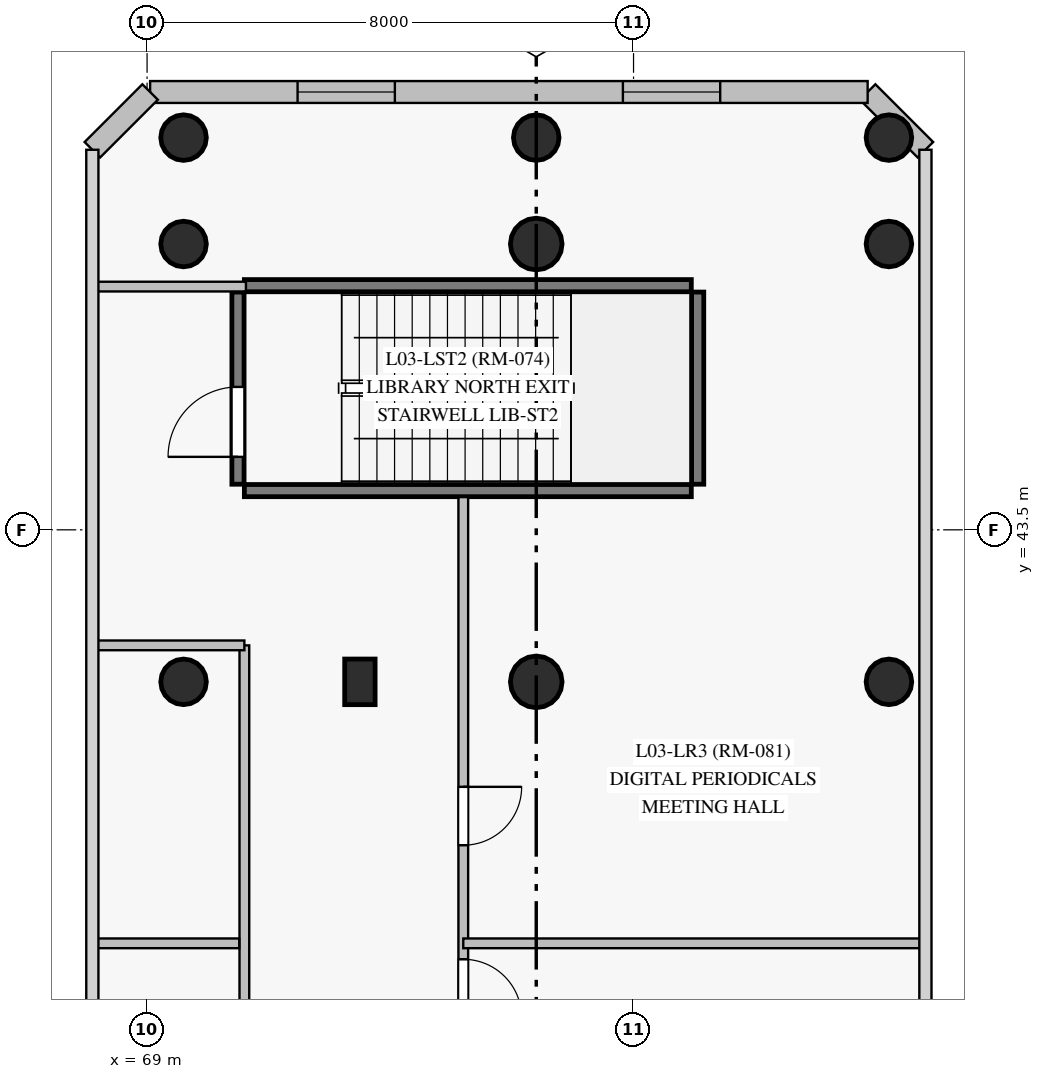
"""IFC4 building model, lengths in metres.
Left out: names, types, materials, properties, quantities, classifications, styles, units other than length and angle.
Written with IfcOpenShell. Run it as: python <this file> out.ifc"""

import sys

from ifc_helpers import new_model, si_unit, direction, frame, frame_2d, origin, origin_with_axes, origin_2d, place, context, subcontext, project, spatial, rectangle, circle, extrude, source, transform, mapped, element, fill, save


model = new_model("IFC4")
c1 = context("Model", 3, precision=1e-05, world=origin(), true_north=direction((0.0, 1.0)))
c2 = subcontext(c1, "Body", "Model", "MODEL_VIEW")
j1 = project(units=[si_unit("LENGTHUNIT", "METRE"), si_unit("PLANEANGLEUNIT", "RADIAN")], contexts=[c1])
p1 = place(None, origin())
s1 = spatial("IfcSite", under=j1, at=p1, CompositionType="ELEMENT")
p2 = place(p1, origin())
s2 = spatial("IfcBuilding", under=s1, at=p2, CompositionType="ELEMENT")
p3 = place(p2, frame((0.0, 0.0, 13.5)))
s3 = spatial("IfcBuildingStorey", under=s2, at=p3, CompositionType="ELEMENT", Elevation=13.5)
m1 = source(origin_with_axes(), c2, "Body", "SweptSolid", [
    extrude(circle(Radius=0.375, at=origin_2d()), origin(), (0.0, 0.0, 1.0), 4.5),
])
for number, where, z_axis, x_axis in (
    (1, (69.6, 49.95, 0.0), (0.0, 0.0, 1.0), (1.0, 0.0, 0.0)),
    (2, (75.4, 49.95, 0.0), (0.0, 0.0, 1.0), (1.0, 0.0, 0.0)),
    (3, (81.2, 49.95, 0.0), (0.0, 0.0, 1.0), (1.0, 0.0, 0.0)),
    (4, (69.6, 41.0, 0.0), (0.0, 0.0, 1.0), (1.0, 0.0, 0.0)),
    (5, (69.6, 48.2, 0.0), (0.0, 0.0, 1.0), (1.0, 0.0, 0.0)),
):
    element("IfcColumn", number, at=place(p3, frame(where, z_axis=z_axis, x_axis=x_axis)), inside=s3, PredefinedType="COLUMN", context=c2, shape_type="MappedRepresentation", body=[
        mapped(m1, transform((0.0, 0.0, 0.0), scale=1.0)),
    ])
m2 = source(origin_with_axes(), c2, "Body", "SweptSolid", [
    extrude(circle(Radius=0.425, at=origin_2d()), origin(), (0.0, 0.0, 1.0), 4.5),
])
for number, where, z_axis, x_axis in (
    (6, (75.4, 41.0, 0.0), (0.0, 0.0, 1.0), (1.0, 0.0, 0.0)),
    (7, (75.4, 48.2, 0.0), (0.0, 0.0, 1.0), (1.0, 0.0, 0.0)),
):
    element("IfcColumn", number, at=place(p3, frame(where, z_axis=z_axis, x_axis=x_axis)), inside=s3, PredefinedType="COLUMN", context=c2, shape_type="MappedRepresentation", body=[
        mapped(m2, transform((0.0, 0.0, 0.0), scale=1.0)),
    ])
for number, where, z_axis, x_axis in (
    (8, (81.2, 41.0, 0.0), (0.0, 0.0, 1.0), (1.0, 0.0, 0.0)),
    (9, (81.2, 48.2, 0.0), (0.0, 0.0, 1.0), (1.0, 0.0, 0.0)),
):
    element("IfcColumn", number, at=place(p3, frame(where, z_axis=z_axis, x_axis=x_axis)), inside=s3, PredefinedType="COLUMN", context=c2, shape_type="MappedRepresentation", body=[
        mapped(m1, transform((0.0, 0.0, 0.0), scale=1.0)),
    ])
m3 = source(origin_with_axes(), c2, "Body", "SweptSolid", [
    extrude(rectangle(XDim=0.5, YDim=0.75, at=origin_2d()), origin(), (0.0, 0.0, 1.0), 4.5),
])
p4 = place(p3, frame((72.5, 41.0, 0.0), z_axis=(0.0, 0.0, 1.0), x_axis=(1.0, 0.0, 0.0)))
e10 = element("IfcColumn", 10, at=p4, inside=s3, PredefinedType="PILASTER", context=c2, shape_type="MappedRepresentation", body=[
    mapped(m3, transform((0.0, 0.0, 0.0), scale=1.0)),
])
p5 = place(p3, frame((81.8, 49.75, 0.0), z_axis=(0.0, 0.0, 1.0), x_axis=(-0.707106781187, 0.707106781187, 0.0)))
e11 = element("IfcWall", 11, at=p5, inside=s3, PredefinedType="SOLIDWALL", context=c2, shape_type="SweptSolid", body=[
    extrude(rectangle(XDim=1.344, YDim=0.36, at=frame_2d((0.672, 0.0))), origin(), (0.0, 0.0, 1.0), 4.225),
])
p6 = place(p3, frame((80.85, 50.7, 0.0), z_axis=(0.0, 0.0, 1.0), x_axis=(-1.0, 0.0, 0.0)))
e12 = element("IfcWall", 12, at=p6, inside=s3, PredefinedType="SOLIDWALL", context=c2, shape_type="SweptSolid", body=[
    extrude(rectangle(XDim=11.8, YDim=0.36, at=frame_2d((5.9, 0.0))), origin(), (0.0, 0.0, 1.0), 4.225),
])
p7 = place(p6, frame((2.425, 0.0, 0.85)))
e13 = element("IfcOpeningElement", 13, at=p7, cuts=e12, PredefinedType="OPENING", context=c2, shape_type="SweptSolid", body=[
    extrude(rectangle(XDim=1.6, YDim=2.2, at=frame_2d((0.8, 1.1))), frame((0.0, 0.19, 0.0), z_axis=(0.0, -1.0, 0.0), x_axis=(1.0, 0.0, 0.0)), (0.0, 0.0, 1.0), 0.38),
])
p8 = place(p6, frame((7.775, 0.0, 0.85)))
e14 = element("IfcOpeningElement", 14, at=p8, cuts=e12, PredefinedType="OPENING", context=c2, shape_type="SweptSolid", body=[
    extrude(rectangle(XDim=1.6, YDim=2.2, at=frame_2d((0.8, 1.1))), frame((0.0, 0.19, 0.0), z_axis=(0.0, -1.0, 0.0), x_axis=(1.0, 0.0, 0.0)), (0.0, 0.0, 1.0), 0.38),
])
p9 = place(p3, frame((69.05, 50.7, 0.0), z_axis=(0.0, 0.0, 1.0), x_axis=(-0.707106781187, -0.707106781187, 0.0)))
e15 = element("IfcWall", 15, at=p9, inside=s3, PredefinedType="SOLIDWALL", context=c2, shape_type="SweptSolid", body=[
    extrude(rectangle(XDim=1.344, YDim=0.36, at=frame_2d((0.672, 0.0))), origin(), (0.0, 0.0, 1.0), 4.225),
])
for number, where, z_axis, x_axis in (
    (16, (70.6, 44.145, 0.0), (0.0, 0.0, 1.0), (1.0, 0.0, 0.0)),
    (17, (70.6, 47.515, 0.0), (0.0, 0.0, 1.0), (1.0, 0.0, 0.0)),
):
    element("IfcWall", number, at=place(p3, frame(where, z_axis=z_axis, x_axis=x_axis)), inside=s3, PredefinedType="SHEAR", context=c2, shape_type="SweptSolid", body=[
        extrude(rectangle(XDim=7.35, YDim=0.2, at=frame_2d((3.675, 0.0))), origin(), (0.0, 0.0, 1.0), 4.225),
    ])
p10 = place(p3, frame((70.495, 44.25, 0.0), z_axis=(0.0, 0.0, 1.0), x_axis=(0.0, 1.0, 0.0)))
e18 = element("IfcWall", 18, at=p10, inside=s3, PredefinedType="SHEAR", context=c2, shape_type="SweptSolid", body=[
    extrude(rectangle(XDim=3.16, YDim=0.2, at=frame_2d((1.58, 0.0))), origin(), (0.0, 0.0, 1.0), 4.225),
])
p11 = place(p10, frame((0.45, 0.0, 0.0)))
e19 = element("IfcOpeningElement", 19, at=p11, cuts=e18, PredefinedType="OPENING", context=c2, shape_type="SweptSolid", body=[
    extrude(rectangle(XDim=1.15, YDim=2.15, at=frame_2d((0.575, 1.075))), frame((0.0, 0.11, 0.0), z_axis=(0.0, -1.0, 0.0), x_axis=(1.0, 0.0, 0.0)), (0.0, 0.0, 1.0), 0.22),
])
p12 = place(p3, frame((78.055, 44.25, 0.0), z_axis=(0.0, 0.0, 1.0), x_axis=(0.0, 1.0, 0.0)))
e20 = element("IfcWall", 20, at=p12, inside=s3, PredefinedType="SHEAR", context=c2, shape_type="SweptSolid", body=[
    extrude(rectangle(XDim=3.16, YDim=0.2, at=frame_2d((1.58, 0.0))), origin(), (0.0, 0.0, 1.0), 4.225),
])
p13 = place(p3, frame((70.6, 11.4, 0.0), z_axis=(0.0, 0.0, 1.0), x_axis=(0.0, 1.0, 0.0)))
e21 = element("IfcWall", 21, at=p13, inside=s3, PredefinedType="PARTITIONING", context=c2, shape_type="SweptSolid", body=[
    extrude(rectangle(XDim=30.2, YDim=0.16, at=frame_2d((15.1, 0.0))), origin(), (0.0, 0.0, 1.0), 4.225),
])
p14 = place(p3, frame((74.2, 44.038, 0.0), z_axis=(0.0, 0.0, 1.0), x_axis=(0.0, -1.0, 0.0)))
e22 = element("IfcWall", 22, at=p14, inside=s3, PredefinedType="PARTITIONING", context=c2, shape_type="SweptSolid", body=[
    extrude(rectangle(XDim=15.138, YDim=0.16, at=frame_2d((7.569, 0.0))), origin(), (0.0, 0.0, 1.0), 4.225),
])
p15 = place(p14, frame((7.6, 0.0, 0.0)))
e23 = element("IfcOpeningElement", 23, at=p15, cuts=e22, PredefinedType="OPENING", context=c2, shape_type="SweptSolid", body=[
    extrude(rectangle(XDim=0.96, YDim=2.15, at=frame_2d((0.48, 1.075))), frame((0.0, 0.09, 0.0), z_axis=(0.0, -1.0, 0.0), x_axis=(1.0, 0.0, 0.0)), (0.0, 0.0, 1.0), 0.18),
])
p16 = place(p14, frame((4.764, 0.0, 0.0)))
e24 = element("IfcOpeningElement", 24, at=p16, cuts=e22, PredefinedType="OPENING", context=c2, shape_type="SweptSolid", body=[
    extrude(rectangle(XDim=0.96, YDim=2.15, at=frame_2d((0.48, 1.075))), frame((0.0, 0.09, 0.0), z_axis=(0.0, -1.0, 0.0), x_axis=(1.0, 0.0, 0.0)), (0.0, 0.0, 1.0), 0.18),
])
p17 = place(p3, frame((74.2, 36.7, 0.0), z_axis=(0.0, 0.0, 1.0), x_axis=(1.0, 0.0, 0.0)))
e25 = element("IfcWall", 25, at=p17, inside=s3, PredefinedType="PARTITIONING", context=c2, shape_type="SweptSolid", body=[
    extrude(rectangle(XDim=7.545, YDim=0.16, at=frame_2d((3.772, 0.0))), origin(), (0.0, 0.0, 1.0), 4.225),
])
p18 = place(p3, frame((68.155, 36.7, 0.0), z_axis=(0.0, 0.0, 1.0), x_axis=(1.0, 0.0, 0.0)))
e26 = element("IfcWall", 26, at=p18, inside=s3, PredefinedType="PARTITIONING", context=c2, shape_type="SweptSolid", body=[
    extrude(rectangle(XDim=2.36, YDim=0.16, at=frame_2d((1.18, 0.0))), origin(), (0.0, 0.0, 1.0), 4.225),
])
p19 = place(p3, frame((70.6, 41.6, 0.0), z_axis=(0.0, 0.0, 1.0), x_axis=(-1.0, 0.0, 0.0)))
e27 = element("IfcWall", 27, at=p19, inside=s3, PredefinedType="PARTITIONING", context=c2, shape_type="SweptSolid", body=[
    extrude(rectangle(XDim=2.415, YDim=0.16, at=frame_2d((1.208, 0.0))), origin(), (0.0, 0.0, 1.0), 3.575),
])
p20 = place(p3, frame((68.185, 47.5, 0.0), z_axis=(0.0, 0.0, 1.0), x_axis=(1.0, 0.0, 0.0)))
e28 = element("IfcWall", 28, at=p20, inside=s3, PredefinedType="PARTITIONING", context=c2, shape_type="SweptSolid", body=[
    extrude(rectangle(XDim=2.441, YDim=0.16, at=frame_2d((1.22, 0.0))), origin(), (0.0, 0.0, 1.0), 4.225),
])
m4 = source(origin_with_axes(), c2, "Body", "SweptSolid", [
    extrude(rectangle(XDim=1.6, YDim=2.2, at=frame_2d((0.8, 1.1))), frame((0.0, 0.03, 0.0), z_axis=(0.0, -1.0, 0.0), x_axis=(1.0, 0.0, 0.0)), (0.0, 0.0, 1.0), 0.06),
])
p21 = place(p7, origin())
e29 = element("IfcWindow", 29, at=p21, inside=s3, PartitioningType="SINGLE_PANEL", PredefinedType="WINDOW", context=c2, shape_type="MappedRepresentation", body=[
    mapped(m4, transform((0.0, 0.0, 0.0), scale=1.0)),
])
fill(e13, e29)
p22 = place(p8, origin())
e30 = element("IfcWindow", 30, at=p22, inside=s3, PartitioningType="SINGLE_PANEL", PredefinedType="WINDOW", context=c2, shape_type="MappedRepresentation", body=[
    mapped(m4, transform((0.0, 0.0, 0.0), scale=1.0)),
])
fill(e14, e30)
m5 = source(origin_with_axes(), c2, "Body", "SweptSolid", [
    extrude(rectangle(XDim=1.15, YDim=2.15, at=frame_2d((0.575, 1.075))), frame((0.0, 0.025, 0.0), z_axis=(0.0, -1.0, 0.0), x_axis=(1.0, 0.0, 0.0)), (0.0, 0.0, 1.0), 0.05),
])
p23 = place(p11, origin())
e31 = element("IfcDoor", 31, at=p23, inside=s3, OperationType="SINGLE_SWING_LEFT", PredefinedType="DOOR", context=c2, shape_type="MappedRepresentation", body=[
    mapped(m5, transform((0.0, 0.0, 0.0), scale=1.0)),
])
fill(e19, e31)
m6 = source(origin_with_axes(), c2, "Body", "SweptSolid", [
    extrude(rectangle(XDim=0.96, YDim=2.15, at=frame_2d((0.48, 1.075))), frame((0.0, 0.025, 0.0), z_axis=(0.0, -1.0, 0.0), x_axis=(1.0, 0.0, 0.0)), (0.0, 0.0, 1.0), 0.05),
])
p24 = place(p15, origin())
e32 = element("IfcDoor", 32, at=p24, inside=s3, OperationType="SINGLE_SWING_RIGHT", PredefinedType="DOOR", context=c2, shape_type="MappedRepresentation", body=[
    mapped(m6, transform((0.0, 0.0, 0.0), scale=1.0)),
])
fill(e23, e32)
p25 = place(p16, origin())
e33 = element("IfcDoor", 33, at=p25, inside=s3, OperationType="SINGLE_SWING_LEFT", PredefinedType="DOOR", context=c2, shape_type="MappedRepresentation", body=[
    mapped(m6, transform((0.0, 0.0, 0.0), scale=1.0)),
])
fill(e24, e33)
save(model, sys.argv[1])
